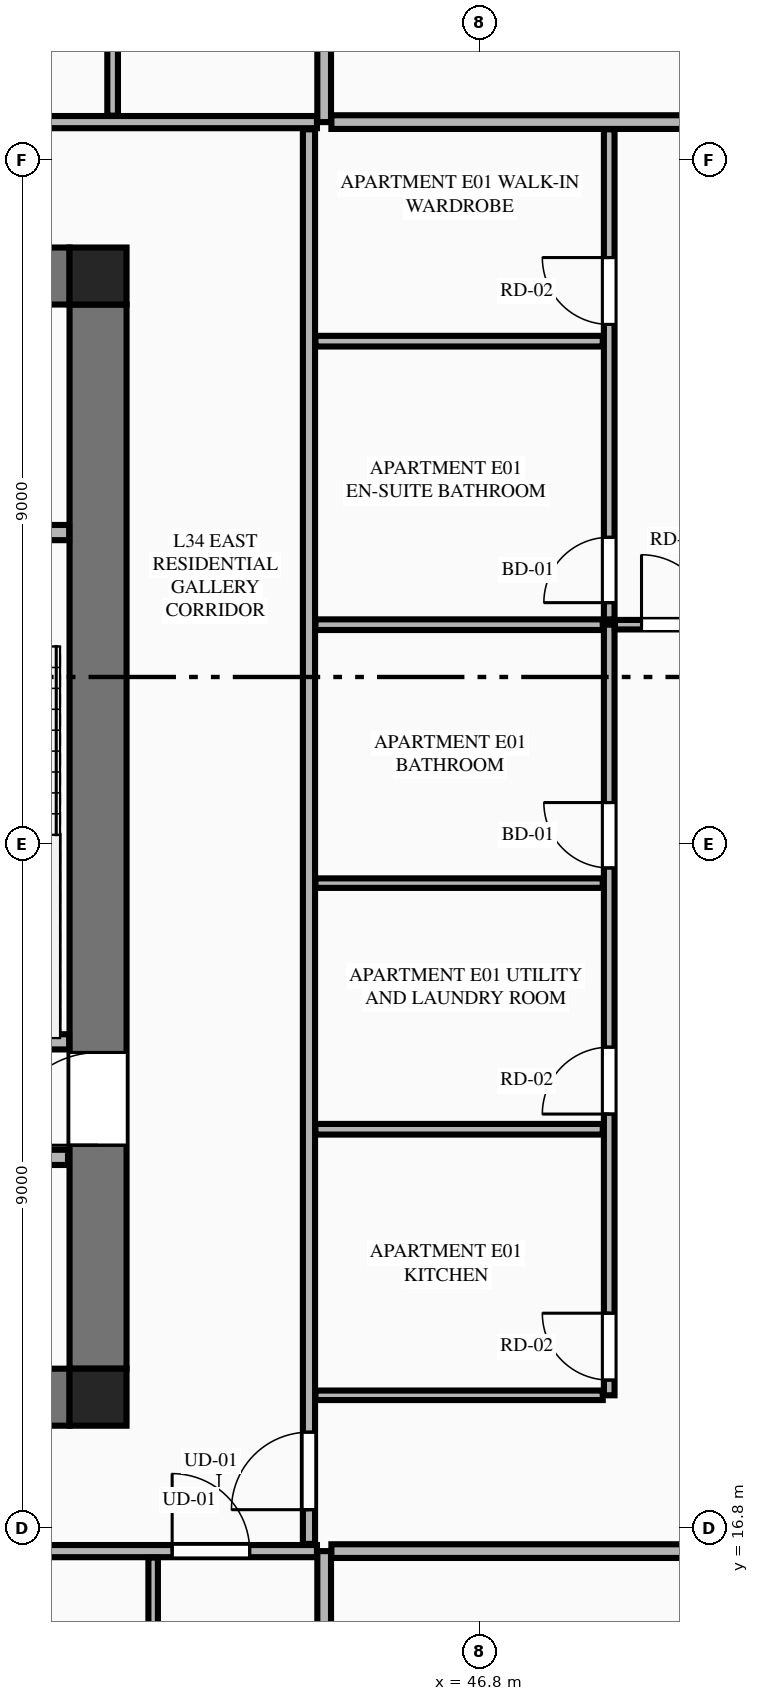
"""IFC4 building model, lengths in metres.
Left out: names, types, materials, properties, quantities, classifications, styles, units other than length and angle.
Written with IfcOpenShell. Run it as: python <this file> out.ifc"""

import sys

from ifc_helpers import new_model, si_unit, direction, frame, frame_2d, origin, origin_2d, place, context, subcontext, project, spatial, rectangle, extrude, element, fill, save


model = new_model("IFC4")
c1 = context("Model", 3, precision=1e-05, world=origin(), true_north=direction((0.0, 1.0)))
c2 = subcontext(c1, "Body", "Model", "MODEL_VIEW")
j1 = project(units=[si_unit("LENGTHUNIT", "METRE"), si_unit("PLANEANGLEUNIT", "RADIAN")], contexts=[c1])
p1 = place(None, origin())
s1 = spatial("IfcSite", under=j1, at=p1, CompositionType="ELEMENT")
p2 = place(p1, origin())
s2 = spatial("IfcBuilding", under=s1, at=p2, CompositionType="ELEMENT")
p3 = place(p2, frame((0.0, 0.0, 130.35)))
s3 = spatial("IfcBuildingStorey", under=s2, at=p3, CompositionType="ELEMENT", Elevation=130.35)
for number, where, z_axis, x_axis in (
    (1, (41.775, 18.525, 0.0), (0.0, 0.0, 1.0), (1.0, 0.0, 0.0)),
    (2, (41.775, 33.275, 0.0), (0.0, 0.0, 1.0), (1.0, 0.0, 0.0)),
):
    element("IfcColumn", number, at=place(p3, frame(where, z_axis=z_axis, x_axis=x_axis)), inside=s3, PredefinedType="COLUMN", context=c2, shape_type="SweptSolid", body=[
        extrude(rectangle(XDim=0.75, YDim=0.75, at=origin_2d()), origin(), (0.0, 0.0, 1.0), 3.55),
    ])
for number, where, z_axis, x_axis in (
    (3, (23.4, 18.525, 0.0), (0.0, 0.0, 1.0), (1.0, 0.0, 0.0)),
    (4, (23.4, 33.275, 0.0), (0.0, 0.0, 1.0), (1.0, 0.0, 0.0)),
):
    element("IfcWall", number, at=place(p3, frame(where, z_axis=z_axis, x_axis=x_axis)), inside=s3, PredefinedType="SHEAR", context=c2, shape_type="SweptSolid", body=[
        extrude(rectangle(XDim=18.0, YDim=0.75, at=frame_2d((9.0, 0.0))), origin(), (0.0, 0.0, 1.0), 3.34),
    ])
p4 = place(p3, frame((41.775, 18.9, 0.0), z_axis=(0.0, 0.0, 1.0), x_axis=(0.0, 1.0, 0.0)))
e5 = element("IfcWall", 5, at=p4, inside=s3, PredefinedType="SHEAR", context=c2, shape_type="SweptSolid", body=[
    extrude(rectangle(XDim=14.0, YDim=0.75, at=frame_2d((7.0, 0.0))), origin(), (0.0, 0.0, 1.0), 3.34),
])
p5 = place(p4, frame((2.94, 0.0, 0.0)))
e6 = element("IfcOpeningElement", 6, at=p5, cuts=e5, PredefinedType="OPENING", context=c2, shape_type="SweptSolid", body=[
    extrude(rectangle(XDim=1.22, YDim=2.25, at=frame_2d((0.61, 1.125))), frame((0.0, 0.385, 0.0), z_axis=(0.0, -1.0, 0.0), x_axis=(1.0, 0.0, 0.0)), (0.0, 0.0, 1.0), 0.77),
])
p6 = place(p3, frame((38.125, 23.2, 0.0), z_axis=(0.0, 0.0, 1.0), x_axis=(1.0, 0.0, 0.0)))
e7 = element("IfcWall", 7, at=p6, inside=s3, PredefinedType="PLUMBINGWALL", context=c2, shape_type="SweptSolid", body=[
    extrude(rectangle(XDim=3.27, YDim=0.2, at=frame_2d((1.635, 0.0))), origin(), (0.0, 0.0, 1.0), 3.34),
])
p7 = place(p3, frame((38.125, 29.9, 0.0), z_axis=(0.0, 0.0, 1.0), x_axis=(1.0, 0.0, 0.0)))
e8 = element("IfcWall", 8, at=p7, inside=s3, PredefinedType="PLUMBINGWALL", context=c2, shape_type="SweptSolid", body=[
    extrude(rectangle(XDim=3.27, YDim=0.2, at=frame_2d((1.635, 0.0))), origin(), (0.0, 0.0, 1.0), 3.34),
])
p8 = place(p7, frame((0.5, 0.0, 0.0)))
e9 = element("IfcOpeningElement", 9, at=p8, cuts=e8, PredefinedType="OPENING", context=c2, shape_type="SweptSolid", body=[
    extrude(rectangle(XDim=0.85, YDim=2.05, at=frame_2d((0.425, 1.025))), frame((0.0, 0.11, 0.0), z_axis=(0.0, -1.0, 0.0), x_axis=(1.0, 0.0, 0.0)), (0.0, 0.0, 1.0), 0.22),
])
p9 = place(p3, frame((23.42, 21.68, 0.0), z_axis=(0.0, 0.0, 1.0), x_axis=(1.0, 0.0, 0.0)))
e10 = element("IfcWall", 10, at=p9, inside=s3, PredefinedType="PLUMBINGWALL", context=c2, shape_type="SweptSolid", body=[
    extrude(rectangle(XDim=17.96, YDim=0.2, at=frame_2d((8.98, 0.0))), origin(), (0.0, 0.0, 1.0), 3.34),
])
p10 = place(p9, frame((11.6, 0.0, 0.0)))
e11 = element("IfcOpeningElement", 11, at=p10, cuts=e10, PredefinedType="OPENING", context=c2, shape_type="SweptSolid", body=[
    extrude(rectangle(XDim=1.1, YDim=2.2, at=frame_2d((0.55, 1.1))), frame((0.0, 0.11, 0.0), z_axis=(0.0, -1.0, 0.0), x_axis=(1.0, 0.0, 0.0)), (0.0, 0.0, 1.0), 0.22),
])
p11 = place(p9, frame((0.41, 0.0, 0.0)))
e12 = element("IfcOpeningElement", 12, at=p11, cuts=e10, PredefinedType="OPENING", context=c2, shape_type="SweptSolid", body=[
    extrude(rectangle(XDim=0.85, YDim=2.05, at=frame_2d((0.425, 1.025))), frame((0.0, 0.11, 0.0), z_axis=(0.0, -1.0, 0.0), x_axis=(1.0, 0.0, 0.0)), (0.0, 0.0, 1.0), 0.22),
])
p12 = place(p9, frame((4.13, 0.0, 0.0)))
e13 = element("IfcOpeningElement", 13, at=p12, cuts=e10, PredefinedType="OPENING", context=c2, shape_type="SweptSolid", body=[
    extrude(rectangle(XDim=0.85, YDim=2.05, at=frame_2d((0.425, 1.025))), frame((0.0, 0.11, 0.0), z_axis=(0.0, -1.0, 0.0), x_axis=(1.0, 0.0, 0.0)), (0.0, 0.0, 1.0), 0.22),
])
p13 = place(p9, frame((7.83, 0.0, 0.0)))
e14 = element("IfcOpeningElement", 14, at=p13, cuts=e10, PredefinedType="OPENING", context=c2, shape_type="SweptSolid", body=[
    extrude(rectangle(XDim=0.85, YDim=2.05, at=frame_2d((0.425, 1.025))), frame((0.0, 0.11, 0.0), z_axis=(0.0, -1.0, 0.0), x_axis=(1.0, 0.0, 0.0)), (0.0, 0.0, 1.0), 0.22),
])
p14 = place(p9, frame((13.78, 0.0, 0.0)))
e15 = element("IfcOpeningElement", 15, at=p14, cuts=e10, PredefinedType="OPENING", context=c2, shape_type="SweptSolid", body=[
    extrude(rectangle(XDim=0.85, YDim=2.05, at=frame_2d((0.425, 1.025))), frame((0.0, 0.11, 0.0), z_axis=(0.0, -1.0, 0.0), x_axis=(1.0, 0.0, 0.0)), (0.0, 0.0, 1.0), 0.22),
])
p15 = place(p9, frame((16.13, 0.0, 0.0)))
e16 = element("IfcOpeningElement", 16, at=p15, cuts=e10, PredefinedType="OPENING", context=c2, shape_type="SweptSolid", body=[
    extrude(rectangle(XDim=0.85, YDim=2.05, at=frame_2d((0.425, 1.025))), frame((0.0, 0.11, 0.0), z_axis=(0.0, -1.0, 0.0), x_axis=(1.0, 0.0, 0.0)), (0.0, 0.0, 1.0), 0.22),
])
p16 = place(p3, frame((44.75, 4.105, 0.0), z_axis=(0.0, 0.0, 1.0), x_axis=(0.0, 1.0, 0.0)))
e17 = element("IfcWall", 17, at=p16, inside=s3, PredefinedType="PARTITIONING", context=c2, shape_type="SweptSolid", body=[
    extrude(rectangle(XDim=12.395, YDim=0.18, at=frame_2d((6.198, 0.0))), origin(), (0.0, 0.0, 1.0), 3.34),
])
p17 = place(p3, frame((28.663, 16.5, 0.0), z_axis=(0.0, 0.0, 1.0), x_axis=(1.0, 0.0, 0.0)))
e18 = element("IfcWall", 18, at=p17, inside=s3, PredefinedType="PARTITIONING", context=c2, shape_type="SweptSolid", body=[
    extrude(rectangle(XDim=15.992, YDim=0.16, at=frame_2d((7.996, 0.0))), origin(), (0.0, 0.0, 1.0), 3.34),
])
p18 = place(p17, frame((14.087, 0.0, 0.0)))
e19 = element("IfcOpeningElement", 19, at=p18, cuts=e18, PredefinedType="OPENING", context=c2, shape_type="SweptSolid", body=[
    extrude(rectangle(XDim=1.02, YDim=2.25, at=frame_2d((0.51, 1.125))), frame((0.0, 0.09, 0.0), z_axis=(0.0, -1.0, 0.0), x_axis=(1.0, 0.0, 0.0)), (0.0, 0.0, 1.0), 0.18),
])
p19 = place(p3, frame((42.5, 10.16, 0.0), z_axis=(0.0, 0.0, 1.0), x_axis=(0.0, 1.0, 0.0)))
e20 = element("IfcWall", 20, at=p19, inside=s3, PredefinedType="PARTITIONING", context=c2, shape_type="SweptSolid", body=[
    extrude(rectangle(XDim=6.255, YDim=0.125, at=frame_2d((3.127, 0.0))), origin(), (0.0, 0.0, 1.0), 2.722),
])
p20 = place(p3, frame((44.75, 35.3, 0.0), z_axis=(0.0, 0.0, 1.0), x_axis=(0.0, 1.0, 0.0)))
e21 = element("IfcWall", 21, at=p20, inside=s3, PredefinedType="PARTITIONING", context=c2, shape_type="SweptSolid", body=[
    extrude(rectangle(XDim=12.195, YDim=0.18, at=frame_2d((6.098, 0.0))), origin(), (0.0, 0.0, 1.0), 3.34),
])
p21 = place(p3, frame((20.145, 35.3, 0.0), z_axis=(0.0, 0.0, 1.0), x_axis=(1.0, 0.0, 0.0)))
e22 = element("IfcWall", 22, at=p21, inside=s3, PredefinedType="PARTITIONING", context=c2, shape_type="SweptSolid", body=[
    extrude(rectangle(XDim=24.51, YDim=0.16, at=frame_2d((12.255, 0.0))), origin(), (0.0, 0.0, 1.0), 3.34),
])
p22 = place(p21, frame((0.405, 0.0, 0.0)))
e23 = element("IfcOpeningElement", 23, at=p22, cuts=e22, PredefinedType="OPENING", context=c2, shape_type="SweptSolid", body=[
    extrude(rectangle(XDim=1.35, YDim=2.35, at=frame_2d((0.675, 1.175))), frame((0.0, 0.09, 0.0), z_axis=(0.0, -1.0, 0.0), x_axis=(1.0, 0.0, 0.0)), (0.0, 0.0, 1.0), 0.18),
])
p23 = place(p3, frame((41.967, 35.385, 0.0), z_axis=(0.0, 0.0, 1.0), x_axis=(0.0, 1.0, 0.0)))
e24 = element("IfcWall", 24, at=p23, inside=s3, PredefinedType="PLUMBINGWALL", context=c2, shape_type="SweptSolid", body=[
    extrude(rectangle(XDim=5.684, YDim=0.14, at=frame_2d((2.842, 0.0))), origin(), (0.0, 0.0, 1.0), 2.722),
])
p24 = place(p3, frame((44.845, 16.5, 0.0), z_axis=(0.0, 0.0, 1.0), x_axis=(1.0, 0.0, 0.0)))
e25 = element("IfcWall", 25, at=p24, inside=s3, PredefinedType="PARTITIONING", context=c2, shape_type="SweptSolid", body=[
    extrude(rectangle(XDim=7.77, YDim=0.18, at=frame_2d((3.885, 0.0))), origin(), (0.0, 0.0, 1.0), 3.34),
])
p25 = place(p3, frame((44.845, 35.3, 0.0), z_axis=(0.0, 0.0, 1.0), x_axis=(1.0, 0.0, 0.0)))
e26 = element("IfcWall", 26, at=p25, inside=s3, PredefinedType="PARTITIONING", context=c2, shape_type="SweptSolid", body=[
    extrude(rectangle(XDim=7.669, YDim=0.18, at=frame_2d((3.834, 0.0))), origin(), (0.0, 0.0, 1.0), 3.34),
])
p26 = place(p3, frame((44.55, 16.595, 0.0), z_axis=(0.0, 0.0, 1.0), x_axis=(0.0, 1.0, 0.0)))
e27 = element("IfcWall", 27, at=p26, inside=s3, PredefinedType="PARTITIONING", context=c2, shape_type="SweptSolid", body=[
    extrude(rectangle(XDim=18.61, YDim=0.16, at=frame_2d((9.305, 0.0))), origin(), (0.0, 0.0, 1.0), 3.34),
])
p27 = place(p26, frame((0.45, 0.0, 0.0)))
e28 = element("IfcOpeningElement", 28, at=p27, cuts=e27, PredefinedType="OPENING", context=c2, shape_type="SweptSolid", body=[
    extrude(rectangle(XDim=1.02, YDim=2.25, at=frame_2d((0.51, 1.125))), frame((0.0, 0.09, 0.0), z_axis=(0.0, -1.0, 0.0), x_axis=(1.0, 0.0, 0.0)), (0.0, 0.0, 1.0), 0.18),
])
p28 = place(p3, frame((44.635, 18.55, 0.0), z_axis=(0.0, 0.0, 1.0), x_axis=(1.0, 0.0, 0.0)))
e29 = element("IfcWall", 29, at=p28, inside=s3, PredefinedType="PARTITIONING", context=c2, shape_type="SweptSolid", body=[
    extrude(rectangle(XDim=3.78, YDim=0.125, at=frame_2d((1.89, 0.0))), origin(), (0.0, 0.0, 1.0), 2.722),
])
p29 = place(p3, frame((48.5, 18.55, 0.0), z_axis=(0.0, 0.0, 1.0), x_axis=(0.0, 1.0, 0.0)))
e30 = element("IfcWall", 30, at=p29, inside=s3, PredefinedType="PLUMBINGWALL", context=c2, shape_type="SweptSolid", body=[
    extrude(rectangle(XDim=10.138, YDim=0.14, at=frame_2d((5.069, 0.0))), origin(), (0.0, 0.0, 1.0), 3.34),
])
p30 = place(p29, frame((0.2, 0.0, 0.0)))
e31 = element("IfcOpeningElement", 31, at=p30, cuts=e30, PredefinedType="OPENING", context=c2, shape_type="SweptSolid", body=[
    extrude(rectangle(XDim=0.88, YDim=2.15, at=frame_2d((0.44, 1.075))), frame((0.0, 0.08, 0.0), z_axis=(0.0, -1.0, 0.0), x_axis=(1.0, 0.0, 0.0)), (0.0, 0.0, 1.0), 0.16),
])
p31 = place(p29, frame((3.7, 0.0, 0.0)))
e32 = element("IfcOpeningElement", 32, at=p31, cuts=e30, PredefinedType="OPENING", context=c2, shape_type="SweptSolid", body=[
    extrude(rectangle(XDim=0.88, YDim=2.15, at=frame_2d((0.44, 1.075))), frame((0.0, 0.08, 0.0), z_axis=(0.0, -1.0, 0.0), x_axis=(1.0, 0.0, 0.0)), (0.0, 0.0, 1.0), 0.16),
])
p32 = place(p29, frame((6.938, 0.0, 0.0)))
e33 = element("IfcOpeningElement", 33, at=p32, cuts=e30, PredefinedType="OPENING", context=c2, shape_type="SweptSolid", body=[
    extrude(rectangle(XDim=0.86, YDim=2.1, at=frame_2d((0.43, 1.05))), frame((0.0, 0.08, 0.0), z_axis=(0.0, -1.0, 0.0), x_axis=(1.0, 0.0, 0.0)), (0.0, 0.0, 1.0), 0.16),
])
p33 = place(p3, frame((48.5, 28.758, 0.0), z_axis=(0.0, 0.0, 1.0), x_axis=(0.0, 1.0, 0.0)))
e34 = element("IfcWall", 34, at=p33, inside=s3, PredefinedType="PLUMBINGWALL", context=c2, shape_type="SweptSolid", body=[
    extrude(rectangle(XDim=6.447, YDim=0.14, at=frame_2d((3.224, 0.0))), origin(), (0.0, 0.0, 1.0), 3.34),
])
p34 = place(p33, frame((0.22, 0.0, 0.0)))
e35 = element("IfcOpeningElement", 35, at=p34, cuts=e34, PredefinedType="OPENING", context=c2, shape_type="SweptSolid", body=[
    extrude(rectangle(XDim=0.86, YDim=2.1, at=frame_2d((0.43, 1.05))), frame((0.0, 0.08, 0.0), z_axis=(0.0, -1.0, 0.0), x_axis=(1.0, 0.0, 0.0)), (0.0, 0.0, 1.0), 0.16),
])
p35 = place(p33, frame((3.88, 0.0, 0.0)))
e36 = element("IfcOpeningElement", 36, at=p35, cuts=e34, PredefinedType="OPENING", context=c2, shape_type="SweptSolid", body=[
    extrude(rectangle(XDim=0.88, YDim=2.15, at=frame_2d((0.44, 1.075))), frame((0.0, 0.08, 0.0), z_axis=(0.0, -1.0, 0.0), x_axis=(1.0, 0.0, 0.0)), (0.0, 0.0, 1.0), 0.16),
])
p36 = place(p3, frame((44.635, 28.688, 0.0), z_axis=(0.0, 0.0, 1.0), x_axis=(1.0, 0.0, 0.0)))
e37 = element("IfcWall", 37, at=p36, inside=s3, PredefinedType="PLUMBINGWALL", context=c2, shape_type="SweptSolid", body=[
    extrude(rectangle(XDim=3.78, YDim=0.14, at=frame_2d((1.89, 0.0))), origin(), (0.0, 0.0, 1.0), 3.34),
])
p37 = place(p3, frame((48.575, 28.688, 0.0), z_axis=(0.0, 0.0, 1.0), x_axis=(1.0, 0.0, 0.0)))
e38 = element("IfcWall", 38, at=p37, inside=s3, PredefinedType="PARTITIONING", context=c2, shape_type="SweptSolid", body=[
    extrude(rectangle(XDim=7.3, YDim=0.125, at=frame_2d((3.65, 0.0))), origin(), (0.0, 0.0, 1.0), 3.34),
])
p38 = place(p37, frame((0.35, 0.0, 0.0)))
e39 = element("IfcOpeningElement", 39, at=p38, cuts=e38, PredefinedType="OPENING", context=c2, shape_type="SweptSolid", body=[
    extrude(rectangle(XDim=0.92, YDim=2.15, at=frame_2d((0.46, 1.075))), frame((0.0, 0.073, 0.0), z_axis=(0.0, -1.0, 0.0), x_axis=(1.0, 0.0, 0.0)), (0.0, 0.0, 1.0), 0.145),
])
p39 = place(p3, frame((44.635, 22.05, 0.0), z_axis=(0.0, 0.0, 1.0), x_axis=(1.0, 0.0, 0.0)))
e40 = element("IfcWall", 40, at=p39, inside=s3, PredefinedType="PLUMBINGWALL", context=c2, shape_type="SweptSolid", body=[
    extrude(rectangle(XDim=3.78, YDim=0.14, at=frame_2d((1.89, 0.0))), origin(), (0.0, 0.0, 1.0), 3.34),
])
p40 = place(p3, frame((44.635, 25.288, 0.0), z_axis=(0.0, 0.0, 1.0), x_axis=(1.0, 0.0, 0.0)))
e41 = element("IfcWall", 41, at=p40, inside=s3, PredefinedType="PARTITIONING", context=c2, shape_type="SweptSolid", body=[
    extrude(rectangle(XDim=3.78, YDim=0.125, at=frame_2d((1.89, 0.0))), origin(), (0.0, 0.0, 1.0), 3.34),
])
p41 = place(p3, frame((44.635, 32.418, 0.0), z_axis=(0.0, 0.0, 1.0), x_axis=(1.0, 0.0, 0.0)))
e42 = element("IfcWall", 42, at=p41, inside=s3, PredefinedType="PLUMBINGWALL", context=c2, shape_type="SweptSolid", body=[
    extrude(rectangle(XDim=3.78, YDim=0.14, at=frame_2d((1.89, 0.0))), origin(), (0.0, 0.0, 1.0), 3.34),
])
p42 = place(p5, origin())
e43 = element("IfcDoor", 43, at=p42, inside=s3, OperationType="SINGLE_SWING_LEFT", PredefinedType="DOOR", context=c2, shape_type="SweptSolid", body=[
    extrude(rectangle(XDim=1.22, YDim=2.25, at=frame_2d((0.61, 1.125))), frame((0.0, 0.025, 0.0), z_axis=(0.0, -1.0, 0.0), x_axis=(1.0, 0.0, 0.0)), (0.0, 0.0, 1.0), 0.05),
])
fill(e6, e43)
p43 = place(p18, origin())
e44 = element("IfcDoor", 44, at=p43, inside=s3, OperationType="SINGLE_SWING_LEFT", PredefinedType="DOOR", context=c2, shape_type="SweptSolid", body=[
    extrude(rectangle(XDim=1.02, YDim=2.25, at=frame_2d((0.51, 1.125))), frame((0.0, 0.025, 0.0), z_axis=(0.0, -1.0, 0.0), x_axis=(1.0, 0.0, 0.0)), (0.0, 0.0, 1.0), 0.05),
])
fill(e19, e44)
p44 = place(p30, origin())
e45 = element("IfcDoor", 45, at=p44, inside=s3, OperationType="SINGLE_SWING_RIGHT", PredefinedType="DOOR", context=c2, shape_type="SweptSolid", body=[
    extrude(rectangle(XDim=0.88, YDim=2.15, at=frame_2d((0.44, 1.075))), frame((0.0, 0.025, 0.0), z_axis=(0.0, -1.0, 0.0), x_axis=(1.0, 0.0, 0.0)), (0.0, 0.0, 1.0), 0.05),
])
fill(e31, e45)
p45 = place(p31, origin())
e46 = element("IfcDoor", 46, at=p45, inside=s3, OperationType="SINGLE_SWING_LEFT", PredefinedType="DOOR", context=c2, shape_type="SweptSolid", body=[
    extrude(rectangle(XDim=0.88, YDim=2.15, at=frame_2d((0.44, 1.075))), frame((0.0, 0.025, 0.0), z_axis=(0.0, -1.0, 0.0), x_axis=(1.0, 0.0, 0.0)), (0.0, 0.0, 1.0), 0.05),
])
fill(e32, e46)
p46 = place(p32, origin())
e47 = element("IfcDoor", 47, at=p46, inside=s3, OperationType="SINGLE_SWING_RIGHT", PredefinedType="DOOR", context=c2, shape_type="SweptSolid", body=[
    extrude(rectangle(XDim=0.86, YDim=2.1, at=frame_2d((0.43, 1.05))), frame((0.0, 0.025, 0.0), z_axis=(0.0, -1.0, 0.0), x_axis=(1.0, 0.0, 0.0)), (0.0, 0.0, 1.0), 0.05),
])
fill(e33, e47)
p47 = place(p34, origin())
e48 = element("IfcDoor", 48, at=p47, inside=s3, OperationType="SINGLE_SWING_LEFT", PredefinedType="DOOR", context=c2, shape_type="SweptSolid", body=[
    extrude(rectangle(XDim=0.86, YDim=2.1, at=frame_2d((0.43, 1.05))), frame((0.0, 0.025, 0.0), z_axis=(0.0, -1.0, 0.0), x_axis=(1.0, 0.0, 0.0)), (0.0, 0.0, 1.0), 0.05),
])
fill(e35, e48)
p48 = place(p35, origin())
e49 = element("IfcDoor", 49, at=p48, inside=s3, OperationType="SINGLE_SWING_RIGHT", PredefinedType="DOOR", context=c2, shape_type="SweptSolid", body=[
    extrude(rectangle(XDim=0.88, YDim=2.15, at=frame_2d((0.44, 1.075))), frame((0.0, 0.025, 0.0), z_axis=(0.0, -1.0, 0.0), x_axis=(1.0, 0.0, 0.0)), (0.0, 0.0, 1.0), 0.05),
])
fill(e36, e49)
p49 = place(p27, origin())
e50 = element("IfcDoor", 50, at=p49, inside=s3, OperationType="SINGLE_SWING_LEFT", PredefinedType="DOOR", context=c2, shape_type="SweptSolid", body=[
    extrude(rectangle(XDim=1.02, YDim=2.25, at=frame_2d((0.51, 1.125))), frame((0.0, 0.025, 0.0), z_axis=(0.0, -1.0, 0.0), x_axis=(1.0, 0.0, 0.0)), (0.0, 0.0, 1.0), 0.05),
])
fill(e28, e50)
p50 = place(p38, origin())
e51 = element("IfcDoor", 51, at=p50, inside=s3, OperationType="SINGLE_SWING_LEFT", PredefinedType="DOOR", context=c2, shape_type="SweptSolid", body=[
    extrude(rectangle(XDim=0.92, YDim=2.15, at=frame_2d((0.46, 1.075))), frame((0.0, 0.025, 0.0), z_axis=(0.0, -1.0, 0.0), x_axis=(1.0, 0.0, 0.0)), (0.0, 0.0, 1.0), 0.05),
])
fill(e39, e51)
save(model, sys.argv[1])
